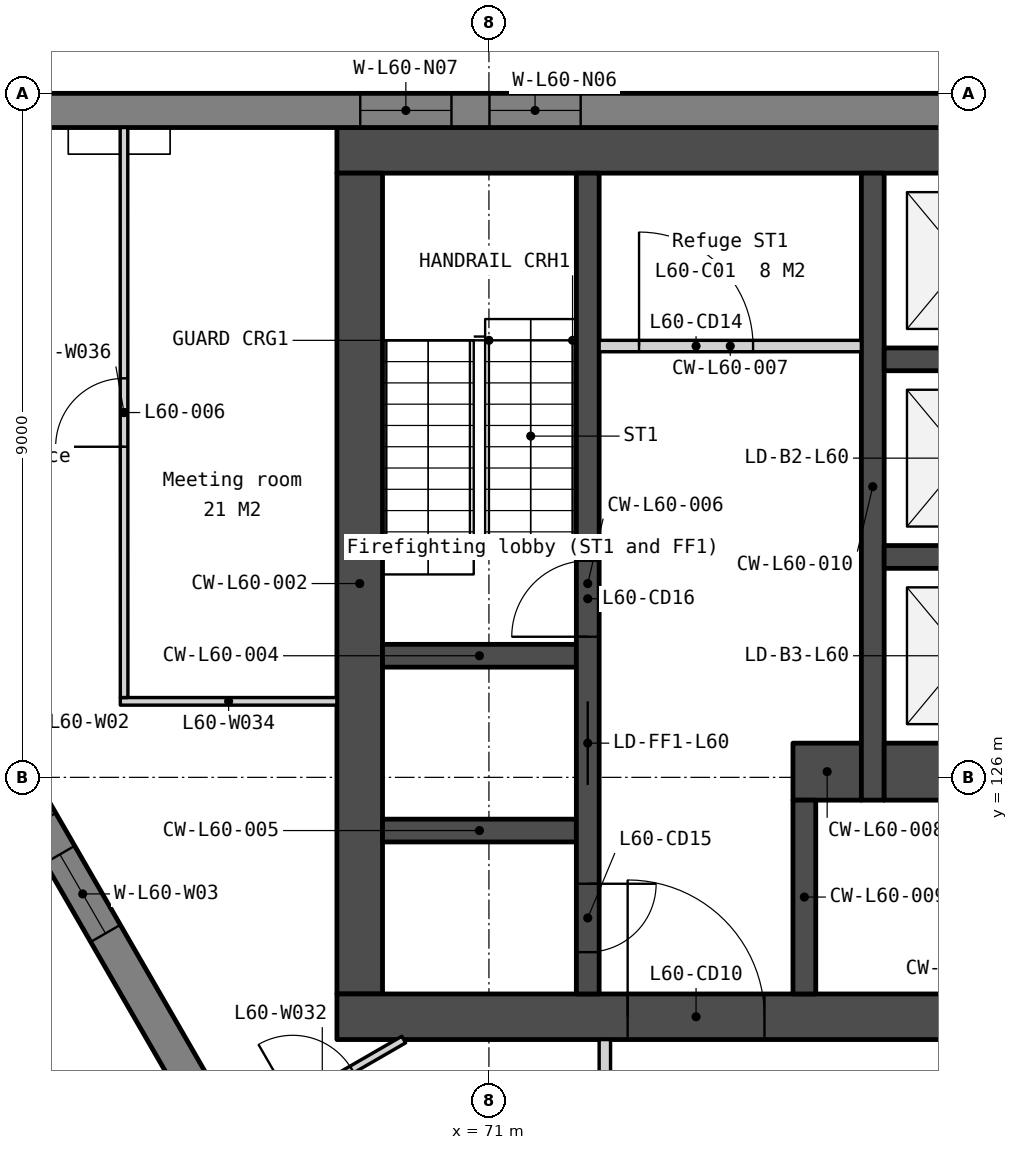
"""IFC4 building model, lengths in metres.
Left out: names, types, materials, properties, quantities, classifications, styles, units other than length and angle.
Written with IfcOpenShell. Run it as: python <this file> out.ifc"""

import sys

from ifc_helpers import new_model, si_unit, direction, frame, frame_2d, origin, place, context, subcontext, project, spatial, polyline, rectangle, outline, extrude, element, fill, save


model = new_model("IFC4")
c1 = context("Model", 3, precision=1e-05, world=origin(), true_north=direction((0.0, 1.0)))
c2 = subcontext(c1, "Body", "Model", "MODEL_VIEW")
j1 = project(units=[si_unit("LENGTHUNIT", "METRE"), si_unit("PLANEANGLEUNIT", "RADIAN")], contexts=[c1])
p1 = place(None, origin())
s1 = spatial("IfcSite", under=j1, at=p1, CompositionType="ELEMENT")
p2 = place(p1, origin())
s2 = spatial("IfcBuilding", under=s1, at=p2, CompositionType="ELEMENT")
p3 = place(p2, frame((0.0, 0.0, 246.5)))
s3 = spatial("IfcBuildingStorey", under=s2, at=p3, CompositionType="ELEMENT", Elevation=246.5)
p4 = place(p3, frame((69.0, 134.25, 0.0), z_axis=(0.0, 0.0, 1.0), x_axis=(1.0, 0.0, 0.0)))
e1 = element("IfcWall", 1, at=p4, inside=s3, PredefinedType="SOLIDWALL", context=c2, shape_type="SweptSolid", body=[
    extrude(rectangle(XDim=22.0, YDim=0.6, at=frame_2d((11.0, 0.0))), origin(), (0.0, 0.0, 1.0), 3.75),
])
p5 = place(p3, frame((69.3, 133.95, 0.0), z_axis=(0.0, 0.0, 1.0), x_axis=(0.0, -1.0, 0.0)))
e2 = element("IfcWall", 2, at=p5, inside=s3, PredefinedType="SOLIDWALL", context=c2, shape_type="SweptSolid", body=[
    extrude(rectangle(XDim=10.8, YDim=0.6, at=frame_2d((5.4, 0.0))), origin(), (0.0, 0.0, 1.0), 3.75),
])
p6 = place(p3, frame((69.0, 122.85, 0.0), z_axis=(0.0, 0.0, 1.0), x_axis=(1.0, 0.0, 0.0)))
e3 = element("IfcWall", 3, at=p6, inside=s3, PredefinedType="SOLIDWALL", context=c2, shape_type="SweptSolid", body=[
    extrude(rectangle(XDim=22.0, YDim=0.6, at=frame_2d((11.0, 0.0))), origin(), (0.0, 0.0, 1.0), 3.75),
])
p7 = place(p6, frame((16.375, 0.0, 0.0)))
e4 = element("IfcOpeningElement", 4, at=p7, cuts=e3, PredefinedType="OPENING", context=c2, shape_type="SweptSolid", body=[
    extrude(rectangle(XDim=1.8, YDim=2.1, at=frame_2d((0.9, 1.05))), frame((0.0, 0.31, 0.0), z_axis=(0.0, -1.0, 0.0), x_axis=(1.0, 0.0, 0.0)), (0.0, 0.0, 1.0), 0.62),
])
p8 = place(p6, frame((3.825, 0.0, 0.0)))
e5 = element("IfcOpeningElement", 5, at=p8, cuts=e3, PredefinedType="OPENING", context=c2, shape_type="SweptSolid", body=[
    extrude(rectangle(XDim=1.8, YDim=2.1, at=frame_2d((0.9, 1.05))), frame((0.0, 0.31, 0.0), z_axis=(0.0, -1.0, 0.0), x_axis=(1.0, 0.0, 0.0)), (0.0, 0.0, 1.0), 0.62),
])
p9 = place(p6, frame((12.85, 0.0, 0.0)))
e6 = element("IfcOpeningElement", 6, at=p9, cuts=e3, PredefinedType="OPENING", context=c2, shape_type="SweptSolid", body=[
    extrude(rectangle(XDim=1.5, YDim=2.1, at=frame_2d((0.75, 1.05))), frame((0.0, 0.31, 0.0), z_axis=(0.0, -1.0, 0.0), x_axis=(1.0, 0.0, 0.0)), (0.0, 0.0, 1.0), 0.62),
])
for number, where, z_axis, x_axis in (
    (7, (69.6, 127.6, 0.0), (0.0, 0.0, 1.0), (1.0, 0.0, 0.0)),
    (8, (69.6, 125.3, 0.0), (0.0, 0.0, 1.0), (1.0, 0.0, 0.0)),
):
    element("IfcWall", number, at=place(p3, frame(where, z_axis=z_axis, x_axis=x_axis)), inside=s3, PredefinedType="SOLIDWALL", context=c2, shape_type="SweptSolid", body=[
        extrude(rectangle(XDim=2.55, YDim=0.3, at=frame_2d((1.275, 0.0))), origin(), (0.0, 0.0, 1.0), 3.75),
    ])
p10 = place(p3, frame((72.3, 133.95, 0.0), z_axis=(0.0, 0.0, 1.0), x_axis=(0.0, -1.0, 0.0)))
e9 = element("IfcWall", 9, at=p10, inside=s3, PredefinedType="SOLIDWALL", context=c2, shape_type="SweptSolid", body=[
    extrude(rectangle(XDim=10.8, YDim=0.3, at=frame_2d((5.4, 0.0))), origin(), (0.0, 0.0, 1.0), 3.75),
])
p11 = place(p10, frame((6.95, 0.0, 0.0)))
e10 = element("IfcOpeningElement", 10, at=p11, cuts=e9, PredefinedType="OPENING", context=c2, shape_type="SweptSolid", body=[
    extrude(rectangle(XDim=1.1, YDim=2.1, at=frame_2d((0.55, 1.05))), frame((0.0, 0.16, 0.0), z_axis=(0.0, -1.0, 0.0), x_axis=(1.0, 0.0, 0.0)), (0.0, 0.0, 1.0), 0.32),
])
p12 = place(p10, frame((9.35, 0.0, 0.0)))
e11 = element("IfcOpeningElement", 11, at=p12, cuts=e9, PredefinedType="OPENING", context=c2, shape_type="SweptSolid", body=[
    extrude(rectangle(XDim=0.9, YDim=2.1, at=frame_2d((0.45, 1.05))), frame((0.0, 0.16, 0.0), z_axis=(0.0, -1.0, 0.0), x_axis=(1.0, 0.0, 0.0)), (0.0, 0.0, 1.0), 0.32),
])
p13 = place(p10, frame((5.1, 0.0, 0.0)))
e12 = element("IfcOpeningElement", 12, at=p13, cuts=e9, PredefinedType="OPENING", context=c2, shape_type="SweptSolid", body=[
    extrude(rectangle(XDim=1.0, YDim=2.1, at=frame_2d((0.5, 1.05))), frame((0.0, 0.16, 0.0), z_axis=(0.0, -1.0, 0.0), x_axis=(1.0, 0.0, 0.0)), (0.0, 0.0, 1.0), 0.32),
])
p14 = place(p3, frame((72.45, 131.675, 0.0), z_axis=(0.0, 0.0, 1.0), x_axis=(1.0, 0.0, 0.0)))
e13 = element("IfcWall", 13, at=p14, inside=s3, PredefinedType="PARTITIONING", context=c2, shape_type="SweptSolid", body=[
    extrude(rectangle(XDim=3.45, YDim=0.15, at=frame_2d((1.725, 0.0))), origin(), (0.0, 0.0, 1.0), 3.75),
])
p15 = place(p14, frame((0.525, 0.0, 0.0)))
e14 = element("IfcOpeningElement", 14, at=p15, cuts=e13, PredefinedType="OPENING", context=c2, shape_type="SweptSolid", body=[
    extrude(rectangle(XDim=1.5, YDim=2.1, at=frame_2d((0.75, 1.05))), frame((0.0, 0.085, 0.0), z_axis=(0.0, -1.0, 0.0), x_axis=(1.0, 0.0, 0.0)), (0.0, 0.0, 1.0), 0.17),
])
p16 = place(p3, frame((75.0, 126.075, 0.0), z_axis=(0.0, 0.0, 1.0), x_axis=(1.0, 0.0, 0.0)))
e15 = element("IfcWall", 15, at=p16, inside=s3, PredefinedType="SOLIDWALL", context=c2, shape_type="SweptSolid", body=[
    extrude(rectangle(XDim=0.9, YDim=0.75, at=frame_2d((0.45, 0.0))), origin(), (0.0, 0.0, 1.0), 3.75),
])
p17 = place(p3, frame((75.15, 125.7, 0.0), z_axis=(0.0, 0.0, 1.0), x_axis=(0.0, -1.0, 0.0)))
e16 = element("IfcWall", 16, at=p17, inside=s3, PredefinedType="SOLIDWALL", context=c2, shape_type="SweptSolid", body=[
    extrude(rectangle(XDim=2.55, YDim=0.3, at=frame_2d((1.275, 0.0))), origin(), (0.0, 0.0, 1.0), 3.75),
])
p18 = place(p3, frame((76.05, 133.95, 0.0), z_axis=(0.0, 0.0, 1.0), x_axis=(0.0, -1.0, 0.0)))
e17 = element("IfcWall", 17, at=p18, inside=s3, PredefinedType="SOLIDWALL", context=c2, shape_type="SweptSolid", body=[
    extrude(rectangle(XDim=8.25, YDim=0.3, at=frame_2d((4.125, 0.0))), origin(), (0.0, 0.0, 1.0), 3.75),
])
for number, where, z_axis, x_axis in (
    (18, (76.2, 131.5, 0.0), (0.0, 0.0, 1.0), (1.0, 0.0, 0.0)),
    (19, (76.2, 128.9, 0.0), (0.0, 0.0, 1.0), (1.0, 0.0, 0.0)),
):
    element("IfcWall", number, at=place(p3, frame(where, z_axis=z_axis, x_axis=x_axis)), inside=s3, PredefinedType="SOLIDWALL", context=c2, shape_type="SweptSolid", body=[
        extrude(rectangle(XDim=2.1, YDim=0.3, at=frame_2d((1.05, 0.0))), origin(), (0.0, 0.0, 1.0), 3.75),
    ])
p19 = place(p3, frame((76.2, 126.075, 0.0), z_axis=(0.0, 0.0, 1.0), x_axis=(1.0, 0.0, 0.0)))
e20 = element("IfcWall", 20, at=p19, inside=s3, PredefinedType="SOLIDWALL", context=c2, shape_type="SweptSolid", body=[
    extrude(rectangle(XDim=2.1, YDim=0.75, at=frame_2d((1.05, 0.0))), origin(), (0.0, 0.0, 1.0), 3.75),
])
p20 = place(p3, frame((98.486, 134.775, -0.15), z_axis=(0.0, 0.0, 1.0), x_axis=(-1.0, 0.0, 0.0)))
e21 = element("IfcWall", 21, at=p20, inside=s3, PredefinedType="SOLIDWALL", context=c2, shape_type="SweptSolid", body=[
    extrude(outline(polyline([(36.972, 0.0), (36.972, 3.9), (0.0, 3.9), (0.0, 0.0), (36.972, 0.0)])), frame((0.0, 0.225, 0.0), z_axis=(0.0, -1.0, 0.0), x_axis=(1.0, 0.0, 0.0)), (0.0, 0.0, 1.0), 0.45),
])
p21 = place(p20, frame((0.744, 0.0, 0.95)))
e22 = element("IfcOpeningElement", 22, at=p21, cuts=e21, PredefinedType="OPENING", context=c2, shape_type="SweptSolid", body=[
    extrude(rectangle(XDim=1.2, YDim=2.2, at=frame_2d((0.6, 1.1))), frame((0.0, 0.235, 0.0), z_axis=(0.0, -1.0, 0.0), x_axis=(1.0, 0.0, 0.0)), (0.0, 0.0, 1.0), 0.47),
])
p22 = place(p20, frame((7.793, 0.0, 0.95)))
e23 = element("IfcOpeningElement", 23, at=p22, cuts=e21, PredefinedType="OPENING", context=c2, shape_type="SweptSolid", body=[
    extrude(rectangle(XDim=1.2, YDim=2.2, at=frame_2d((0.6, 1.1))), frame((0.0, 0.235, 0.0), z_axis=(0.0, -1.0, 0.0), x_axis=(1.0, 0.0, 0.0)), (0.0, 0.0, 1.0), 0.47),
])
p23 = place(p20, frame((9.493, 0.0, 0.95)))
e24 = element("IfcOpeningElement", 24, at=p23, cuts=e21, PredefinedType="OPENING", context=c2, shape_type="SweptSolid", body=[
    extrude(rectangle(XDim=1.2, YDim=2.2, at=frame_2d((0.6, 1.1))), frame((0.0, 0.235, 0.0), z_axis=(0.0, -1.0, 0.0), x_axis=(1.0, 0.0, 0.0)), (0.0, 0.0, 1.0), 0.47),
])
p24 = place(p20, frame((17.036, 0.0, 0.95)))
e25 = element("IfcOpeningElement", 25, at=p24, cuts=e21, PredefinedType="OPENING", context=c2, shape_type="SweptSolid", body=[
    extrude(rectangle(XDim=1.2, YDim=2.2, at=frame_2d((0.6, 1.1))), frame((0.0, 0.235, 0.0), z_axis=(0.0, -1.0, 0.0), x_axis=(1.0, 0.0, 0.0)), (0.0, 0.0, 1.0), 0.47),
])
p25 = place(p20, frame((18.736, 0.0, 0.95)))
e26 = element("IfcOpeningElement", 26, at=p25, cuts=e21, PredefinedType="OPENING", context=c2, shape_type="SweptSolid", body=[
    extrude(rectangle(XDim=1.2, YDim=2.2, at=frame_2d((0.6, 1.1))), frame((0.0, 0.235, 0.0), z_axis=(0.0, -1.0, 0.0), x_axis=(1.0, 0.0, 0.0)), (0.0, 0.0, 1.0), 0.47),
])
p26 = place(p20, frame((26.279, 0.0, 0.95)))
e27 = element("IfcOpeningElement", 27, at=p26, cuts=e21, PredefinedType="OPENING", context=c2, shape_type="SweptSolid", body=[
    extrude(rectangle(XDim=1.2, YDim=2.2, at=frame_2d((0.6, 1.1))), frame((0.0, 0.235, 0.0), z_axis=(0.0, -1.0, 0.0), x_axis=(1.0, 0.0, 0.0)), (0.0, 0.0, 1.0), 0.47),
])
p27 = place(p20, frame((27.979, 0.0, 0.95)))
e28 = element("IfcOpeningElement", 28, at=p27, cuts=e21, PredefinedType="OPENING", context=c2, shape_type="SweptSolid", body=[
    extrude(rectangle(XDim=1.2, YDim=2.2, at=frame_2d((0.6, 1.1))), frame((0.0, 0.235, 0.0), z_axis=(0.0, -1.0, 0.0), x_axis=(1.0, 0.0, 0.0)), (0.0, 0.0, 1.0), 0.47),
])
p28 = place(p20, frame((35.028, 0.0, 0.95)))
e29 = element("IfcOpeningElement", 29, at=p28, cuts=e21, PredefinedType="OPENING", context=c2, shape_type="SweptSolid", body=[
    extrude(rectangle(XDim=1.2, YDim=2.2, at=frame_2d((0.6, 1.1))), frame((0.0, 0.235, 0.0), z_axis=(0.0, -1.0, 0.0), x_axis=(1.0, 0.0, 0.0)), (0.0, 0.0, 1.0), 0.47),
])
p29 = place(p3, frame((60.609, 133.207, -0.15), z_axis=(0.0, 0.0, 1.0), x_axis=(0.500002536638, -0.866023939251, 0.0)))
e30 = element("IfcWall", 30, at=p29, inside=s3, PredefinedType="SOLIDWALL", context=c2, shape_type="SweptSolid", body=[
    extrude(outline(polyline([(36.972, 0.0), (36.972, 3.9), (0.0, 3.9), (0.0, 0.0), (36.972, 0.0)])), frame((0.0, 0.225, 0.0), z_axis=(0.0, -1.0, 0.0), x_axis=(1.0, 0.0, 0.0)), (0.0, 0.0, 1.0), 0.45),
])
p30 = place(p29, frame((0.744, 0.0, 0.95)))
e31 = element("IfcOpeningElement", 31, at=p30, cuts=e30, PredefinedType="OPENING", context=c2, shape_type="SweptSolid", body=[
    extrude(rectangle(XDim=1.2, YDim=2.2, at=frame_2d((0.6, 1.1))), frame((0.0, 0.235, 0.0), z_axis=(0.0, -1.0, 0.0), x_axis=(1.0, 0.0, 0.0)), (0.0, 0.0, 1.0), 0.47),
])
p31 = place(p29, frame((7.793, 0.0, 0.95)))
e32 = element("IfcOpeningElement", 32, at=p31, cuts=e30, PredefinedType="OPENING", context=c2, shape_type="SweptSolid", body=[
    extrude(rectangle(XDim=1.2, YDim=2.2, at=frame_2d((0.6, 1.1))), frame((0.0, 0.235, 0.0), z_axis=(0.0, -1.0, 0.0), x_axis=(1.0, 0.0, 0.0)), (0.0, 0.0, 1.0), 0.47),
])
p32 = place(p29, frame((9.493, 0.0, 0.95)))
e33 = element("IfcOpeningElement", 33, at=p32, cuts=e30, PredefinedType="OPENING", context=c2, shape_type="SweptSolid", body=[
    extrude(rectangle(XDim=1.2, YDim=2.2, at=frame_2d((0.6, 1.1))), frame((0.0, 0.235, 0.0), z_axis=(0.0, -1.0, 0.0), x_axis=(1.0, 0.0, 0.0)), (0.0, 0.0, 1.0), 0.47),
])
p33 = place(p29, frame((17.036, 0.0, 0.95)))
e34 = element("IfcOpeningElement", 34, at=p33, cuts=e30, PredefinedType="OPENING", context=c2, shape_type="SweptSolid", body=[
    extrude(rectangle(XDim=1.2, YDim=2.2, at=frame_2d((0.6, 1.1))), frame((0.0, 0.235, 0.0), z_axis=(0.0, -1.0, 0.0), x_axis=(1.0, 0.0, 0.0)), (0.0, 0.0, 1.0), 0.47),
])
p34 = place(p29, frame((18.736, 0.0, 0.95)))
e35 = element("IfcOpeningElement", 35, at=p34, cuts=e30, PredefinedType="OPENING", context=c2, shape_type="SweptSolid", body=[
    extrude(rectangle(XDim=1.2, YDim=2.2, at=frame_2d((0.6, 1.1))), frame((0.0, 0.235, 0.0), z_axis=(0.0, -1.0, 0.0), x_axis=(1.0, 0.0, 0.0)), (0.0, 0.0, 1.0), 0.47),
])
p35 = place(p29, frame((26.279, 0.0, 0.95)))
e36 = element("IfcOpeningElement", 36, at=p35, cuts=e30, PredefinedType="OPENING", context=c2, shape_type="SweptSolid", body=[
    extrude(rectangle(XDim=1.2, YDim=2.2, at=frame_2d((0.6, 1.1))), frame((0.0, 0.235, 0.0), z_axis=(0.0, -1.0, 0.0), x_axis=(1.0, 0.0, 0.0)), (0.0, 0.0, 1.0), 0.47),
])
p36 = place(p29, frame((27.979, 0.0, 0.95)))
e37 = element("IfcOpeningElement", 37, at=p36, cuts=e30, PredefinedType="OPENING", context=c2, shape_type="SweptSolid", body=[
    extrude(rectangle(XDim=1.2, YDim=2.2, at=frame_2d((0.6, 1.1))), frame((0.0, 0.235, 0.0), z_axis=(0.0, -1.0, 0.0), x_axis=(1.0, 0.0, 0.0)), (0.0, 0.0, 1.0), 0.47),
])
p37 = place(p29, frame((35.028, 0.0, 0.95)))
e38 = element("IfcOpeningElement", 38, at=p37, cuts=e30, PredefinedType="OPENING", context=c2, shape_type="SweptSolid", body=[
    extrude(rectangle(XDim=1.2, YDim=2.2, at=frame_2d((0.6, 1.1))), frame((0.0, 0.235, 0.0), z_axis=(0.0, -1.0, 0.0), x_axis=(1.0, 0.0, 0.0)), (0.0, 0.0, 1.0), 0.47),
])
p38 = place(p3, frame((72.525, 119.875, 0.0), z_axis=(0.0, 0.0, 1.0), x_axis=(0.0, 1.0, 0.0)))
e39 = element("IfcWall", 39, at=p38, inside=s3, PredefinedType="PARTITIONING", context=c2, shape_type="SweptSolid", body=[
    extrude(rectangle(XDim=2.675, YDim=0.15, at=frame_2d((1.337, 0.0))), origin(), (0.0, 0.0, 1.0), 3.75),
])
p39 = place(p38, frame((0.837, 0.0, 0.0)))
e40 = element("IfcOpeningElement", 40, at=p39, cuts=e39, PredefinedType="OPENING", context=c2, shape_type="SweptSolid", body=[
    extrude(rectangle(XDim=1.0, YDim=2.1, at=frame_2d((0.5, 1.05))), frame((0.0, 0.085, 0.0), z_axis=(0.0, -1.0, 0.0), x_axis=(1.0, 0.0, 0.0)), (0.0, 0.0, 1.0), 0.17),
])
p40 = place(p3, frame((67.736, 121.313, 0.0), z_axis=(0.0, 0.0, 1.0), x_axis=(0.866024577697, 0.500001430823, 0.0)))
e41 = element("IfcWall", 41, at=p40, inside=s3, PredefinedType="PARTITIONING", context=c2, shape_type="SweptSolid", body=[
    extrude(rectangle(XDim=2.475, YDim=0.1, at=frame_2d((1.237, 0.0))), origin(), (0.0, 0.0, 1.0), 3.75),
])
p41 = place(p40, frame((0.787, 0.0, 0.0)))
e42 = element("IfcOpeningElement", 42, at=p41, cuts=e41, PredefinedType="OPENING", context=c2, shape_type="SweptSolid", body=[
    extrude(rectangle(XDim=0.9, YDim=2.1, at=frame_2d((0.45, 1.05))), frame((0.0, 0.06, 0.0), z_axis=(0.0, -1.0, 0.0), x_axis=(1.0, 0.0, 0.0)), (0.0, 0.0, 1.0), 0.12),
])
p42 = place(p3, frame((66.15, 127.0, 0.0), z_axis=(0.0, 0.0, 1.0), x_axis=(1.0, 0.0, 0.0)))
e43 = element("IfcWall", 43, at=p42, inside=s3, PredefinedType="PARTITIONING", context=c2, shape_type="SweptSolid", body=[
    extrude(rectangle(XDim=2.85, YDim=0.1, at=frame_2d((1.425, 0.0))), origin(), (0.0, 0.0, 1.0), 3.75),
])
p43 = place(p3, frame((66.2, 127.05, 0.0), z_axis=(0.0, 0.0, 1.0), x_axis=(-0.000260425135, 0.999999966089, 0.0)))
e44 = element("IfcWall", 44, at=p43, inside=s3, PredefinedType="PARTITIONING", context=c2, shape_type="SweptSolid", body=[
    extrude(rectangle(XDim=7.5, YDim=0.1, at=frame_2d((3.75, 0.0))), origin(), (0.0, 0.0, 1.0), 3.28),
])
p44 = place(p43, frame((3.3, 0.0, 0.0)))
e45 = element("IfcOpeningElement", 45, at=p44, cuts=e44, PredefinedType="OPENING", context=c2, shape_type="SweptSolid", body=[
    extrude(rectangle(XDim=0.9, YDim=2.1, at=frame_2d((0.45, 1.05))), frame((0.0, 0.06, 0.0), z_axis=(0.0, -1.0, 0.0), x_axis=(1.0, 0.0, 0.0)), (0.0, 0.0, 1.0), 0.12),
])
p45 = place(p11, origin())
e46 = element("IfcDoor", 46, at=p45, inside=s3, OperationType="SLIDING_TO_LEFT", PredefinedType="DOOR", context=c2, shape_type="SweptSolid", body=[
    extrude(rectangle(XDim=1.1, YDim=2.1, at=frame_2d((0.55, 1.05))), frame((0.0, 0.025, 0.0), z_axis=(0.0, -1.0, 0.0), x_axis=(1.0, 0.0, 0.0)), (0.0, 0.0, 1.0), 0.05),
])
fill(e10, e46)
p46 = place(p8, origin())
e47 = element("IfcDoor", 47, at=p46, inside=s3, OperationType="DOUBLE_DOOR_DOUBLE_SWING", PredefinedType="DOOR", context=c2, shape_type="SweptSolid", body=[
    extrude(rectangle(XDim=1.8, YDim=2.1, at=frame_2d((0.9, 1.05))), frame((0.0, 0.025, 0.0), z_axis=(0.0, -1.0, 0.0), x_axis=(1.0, 0.0, 0.0)), (0.0, 0.0, 1.0), 0.05),
])
fill(e5, e47)
p47 = place(p15, origin())
e48 = element("IfcDoor", 48, at=p47, inside=s3, OperationType="DOUBLE_DOOR_DOUBLE_SWING", PredefinedType="DOOR", context=c2, shape_type="SweptSolid", body=[
    extrude(rectangle(XDim=1.5, YDim=2.1, at=frame_2d((0.75, 1.05))), frame((0.0, 0.025, 0.0), z_axis=(0.0, -1.0, 0.0), x_axis=(1.0, 0.0, 0.0)), (0.0, 0.0, 1.0), 0.05),
])
fill(e14, e48)
p48 = place(p12, origin())
e49 = element("IfcDoor", 49, at=p48, inside=s3, OperationType="SINGLE_SWING_LEFT", PredefinedType="DOOR", context=c2, shape_type="SweptSolid", body=[
    extrude(rectangle(XDim=0.9, YDim=2.1, at=frame_2d((0.45, 1.05))), frame((0.0, 0.025, 0.0), z_axis=(0.0, -1.0, 0.0), x_axis=(1.0, 0.0, 0.0)), (0.0, 0.0, 1.0), 0.05),
])
fill(e11, e49)
p49 = place(p13, origin())
e50 = element("IfcDoor", 50, at=p49, inside=s3, OperationType="SINGLE_SWING_RIGHT", PredefinedType="DOOR", context=c2, shape_type="SweptSolid", body=[
    extrude(rectangle(XDim=1.0, YDim=2.1, at=frame_2d((0.5, 1.05))), frame((0.0, 0.025, 0.0), z_axis=(0.0, -1.0, 0.0), x_axis=(1.0, 0.0, 0.0)), (0.0, 0.0, 1.0), 0.05),
])
fill(e12, e50)
p50 = place(p26, origin())
e51 = element("IfcWindow", 51, at=p50, inside=s3, PartitioningType="SINGLE_PANEL", PredefinedType="WINDOW", context=c2, shape_type="SweptSolid", body=[
    extrude(rectangle(XDim=1.2, YDim=2.2, at=frame_2d((0.6, 1.1))), frame((0.0, 0.03, 0.0), z_axis=(0.0, -1.0, 0.0), x_axis=(1.0, 0.0, 0.0)), (0.0, 0.0, 1.0), 0.06),
])
fill(e27, e51)
p51 = place(p27, origin())
e52 = element("IfcWindow", 52, at=p51, inside=s3, PartitioningType="SINGLE_PANEL", PredefinedType="WINDOW", context=c2, shape_type="SweptSolid", body=[
    extrude(rectangle(XDim=1.2, YDim=2.2, at=frame_2d((0.6, 1.1))), frame((0.0, 0.03, 0.0), z_axis=(0.0, -1.0, 0.0), x_axis=(1.0, 0.0, 0.0)), (0.0, 0.0, 1.0), 0.06),
])
fill(e28, e52)
p52 = place(p32, origin())
e53 = element("IfcWindow", 53, at=p52, inside=s3, PartitioningType="SINGLE_PANEL", PredefinedType="WINDOW", context=c2, shape_type="SweptSolid", body=[
    extrude(rectangle(XDim=1.2, YDim=2.2, at=frame_2d((0.6, 1.1))), frame((0.0, 0.03, 0.0), z_axis=(0.0, -1.0, 0.0), x_axis=(1.0, 0.0, 0.0)), (0.0, 0.0, 1.0), 0.06),
])
fill(e33, e53)
p53 = place(p44, origin())
e54 = element("IfcDoor", 54, at=p53, inside=s3, OperationType="SINGLE_SWING_LEFT", PredefinedType="DOOR", context=c2, shape_type="SweptSolid", body=[
    extrude(rectangle(XDim=0.9, YDim=2.1, at=frame_2d((0.45, 1.05))), frame((0.0, 0.025, 0.0), z_axis=(0.0, -1.0, 0.0), x_axis=(1.0, 0.0, 0.0)), (0.0, 0.0, 1.0), 0.05),
])
fill(e45, e54)
p54 = place(p41, origin())
e55 = element("IfcDoor", 55, at=p54, inside=s3, OperationType="SINGLE_SWING_LEFT", PredefinedType="DOOR", context=c2, shape_type="SweptSolid", body=[
    extrude(rectangle(XDim=0.9, YDim=2.1, at=frame_2d((0.45, 1.05))), frame((0.0, 0.025, 0.0), z_axis=(0.0, -1.0, 0.0), x_axis=(1.0, 0.0, 0.0)), (0.0, 0.0, 1.0), 0.05),
])
fill(e42, e55)
save(model, sys.argv[1])
